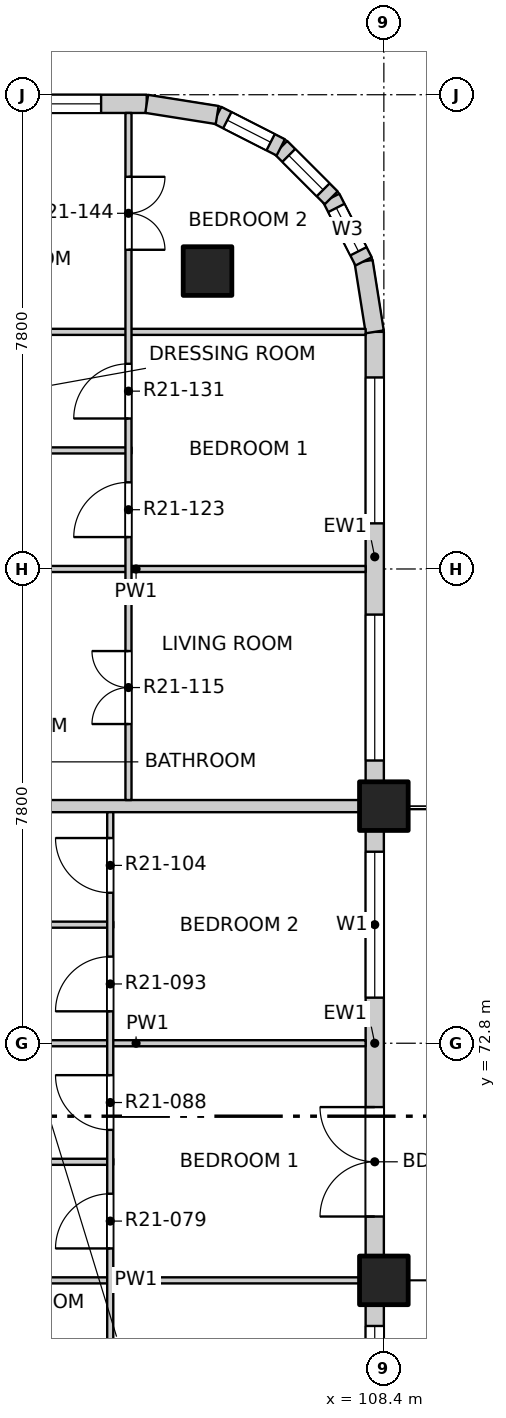
"""IFC4 building model, lengths in metres.
Left out: names, types, materials, properties, quantities, classifications, styles, units other than length and angle.
Written with IfcOpenShell. Run it as: python <this file> out.ifc"""

import sys

from ifc_helpers import new_model, si_unit, direction, frame, frame_2d, origin, origin_2d, place, context, subcontext, project, spatial, rectangle, extrude, element, fill, save


model = new_model("IFC4")
c1 = context("Model", 3, precision=1e-05, world=origin(), true_north=direction((0.0, 1.0)))
c2 = subcontext(c1, "Body", "Model", "MODEL_VIEW")
j1 = project(units=[si_unit("LENGTHUNIT", "METRE"), si_unit("PLANEANGLEUNIT", "RADIAN")], contexts=[c1])
p1 = place(None, origin())
s1 = spatial("IfcSite", under=j1, at=p1, CompositionType="ELEMENT")
p2 = place(p1, origin())
s2 = spatial("IfcBuilding", under=s1, at=p2, CompositionType="ELEMENT")
p3 = place(p2, frame((0.0, 0.0, 214.3)))
s3 = spatial("IfcBuildingStorey", under=s2, at=p3, CompositionType="ELEMENT", Elevation=214.3)
for number, where, z_axis, x_axis in (
    (1, (105.5, 85.5, -0.25), (0.0, 0.0, 1.0), (1.0, 0.0, 0.0)),
    (2, (108.4, 68.9, -0.25), (0.0, 0.0, 1.0), (1.0, 0.0, 0.0)),
    (3, (108.4, 76.7, -0.25), (0.0, 0.0, 1.0), (1.0, 0.0, 0.0)),
):
    element("IfcColumn", number, at=place(p3, frame(where, z_axis=z_axis, x_axis=x_axis)), inside=s3, PredefinedType="COLUMN", context=c2, shape_type="SweptSolid", body=[
        extrude(rectangle(XDim=0.8, YDim=0.8, at=origin_2d()), origin(), (0.0, 0.0, 1.0), 3.4),
    ])
p4 = place(p3, frame((108.25, 61.5, 0.0), z_axis=(0.0, 0.0, 1.0), x_axis=(0.0, 1.0, 0.0)))
e4 = element("IfcWall", 4, at=p4, inside=s3, PredefinedType="SOLIDWALL", context=c2, shape_type="SweptSolid", body=[
    extrude(rectangle(XDim=7.0, YDim=0.3, at=frame_2d((3.5, 0.0))), origin(), (0.0, 0.0, 1.0), 2.7),
])
p5 = place(p4, frame((0.65, 0.0, 0.0)))
e5 = element("IfcOpeningElement", 5, at=p5, cuts=e4, PredefinedType="OPENING", context=c2, shape_type="SweptSolid", body=[
    extrude(rectangle(XDim=1.8, YDim=2.4, at=frame_2d((0.9, 1.2))), frame((0.0, 0.16, 0.0), z_axis=(0.0, -1.0, 0.0), x_axis=(1.0, 0.0, 0.0)), (0.0, 0.0, 1.0), 0.32),
])
p6 = place(p4, frame((4.25, 0.0, 0.9)))
e6 = element("IfcOpeningElement", 6, at=p6, cuts=e4, PredefinedType="OPENING", context=c2, shape_type="SweptSolid", body=[
    extrude(rectangle(XDim=2.4, YDim=1.8, at=frame_2d((1.2, 0.9))), frame((0.0, 0.16, 0.0), z_axis=(0.0, -1.0, 0.0), x_axis=(1.0, 0.0, 0.0)), (0.0, 0.0, 1.0), 0.32),
])
p7 = place(p3, frame((108.25, 69.3, 0.0), z_axis=(0.0, 0.0, 1.0), x_axis=(0.0, 1.0, 0.0)))
e7 = element("IfcWall", 7, at=p7, inside=s3, PredefinedType="SOLIDWALL", context=c2, shape_type="SweptSolid", body=[
    extrude(rectangle(XDim=7.0, YDim=0.3, at=frame_2d((3.5, 0.0))), origin(), (0.0, 0.0, 1.0), 2.7),
])
p8 = place(p7, frame((0.65, 0.0, 0.0)))
e8 = element("IfcOpeningElement", 8, at=p8, cuts=e7, PredefinedType="OPENING", context=c2, shape_type="SweptSolid", body=[
    extrude(rectangle(XDim=1.8, YDim=2.4, at=frame_2d((0.9, 1.2))), frame((0.0, 0.16, 0.0), z_axis=(0.0, -1.0, 0.0), x_axis=(1.0, 0.0, 0.0)), (0.0, 0.0, 1.0), 0.32),
])
p9 = place(p7, frame((4.25, 0.0, 0.9)))
e9 = element("IfcOpeningElement", 9, at=p9, cuts=e7, PredefinedType="OPENING", context=c2, shape_type="SweptSolid", body=[
    extrude(rectangle(XDim=2.4, YDim=1.8, at=frame_2d((1.2, 0.9))), frame((0.0, 0.16, 0.0), z_axis=(0.0, -1.0, 0.0), x_axis=(1.0, 0.0, 0.0)), (0.0, 0.0, 1.0), 0.32),
])
p10 = place(p3, frame((108.25, 77.1, 0.0), z_axis=(0.0, 0.0, 1.0), x_axis=(0.0, 1.0, 0.0)))
e10 = element("IfcWall", 10, at=p10, inside=s3, PredefinedType="SOLIDWALL", context=c2, shape_type="SweptSolid", body=[
    extrude(rectangle(XDim=7.4, YDim=0.3, at=frame_2d((3.7, 0.0))), origin(), (0.0, 0.0, 1.0), 2.7),
])
p11 = place(p10, frame((0.35, 0.0, 0.9)))
e11 = element("IfcOpeningElement", 11, at=p11, cuts=e10, PredefinedType="OPENING", context=c2, shape_type="SweptSolid", body=[
    extrude(rectangle(XDim=2.4, YDim=1.8, at=frame_2d((1.2, 0.9))), frame((0.0, 0.16, 0.0), z_axis=(0.0, -1.0, 0.0), x_axis=(1.0, 0.0, 0.0)), (0.0, 0.0, 1.0), 0.32),
])
p12 = place(p10, frame((4.25, 0.0, 0.9)))
e12 = element("IfcOpeningElement", 12, at=p12, cuts=e10, PredefinedType="OPENING", context=c2, shape_type="SweptSolid", body=[
    extrude(rectangle(XDim=2.4, YDim=1.8, at=frame_2d((1.2, 0.9))), frame((0.0, 0.16, 0.0), z_axis=(0.0, -1.0, 0.0), x_axis=(1.0, 0.0, 0.0)), (0.0, 0.0, 1.0), 0.32),
])
p13 = place(p3, frame((97.1, 88.25, 0.0), z_axis=(0.0, 0.0, 1.0), x_axis=(1.0, 0.0, 0.0)))
e13 = element("IfcWall", 13, at=p13, inside=s3, PredefinedType="SOLIDWALL", context=c2, shape_type="SweptSolid", body=[
    extrude(rectangle(XDim=7.4, YDim=0.3, at=frame_2d((3.7, 0.0))), origin(), (0.0, 0.0, 1.0), 2.7),
])
p14 = place(p13, frame((0.35, 0.0, 0.9)))
e14 = element("IfcOpeningElement", 14, at=p14, cuts=e13, PredefinedType="OPENING", context=c2, shape_type="SweptSolid", body=[
    extrude(rectangle(XDim=2.4, YDim=1.8, at=frame_2d((1.2, 0.9))), frame((0.0, 0.16, 0.0), z_axis=(0.0, -1.0, 0.0), x_axis=(1.0, 0.0, 0.0)), (0.0, 0.0, 1.0), 0.32),
])
p15 = place(p13, frame((4.25, 0.0, 0.9)))
e15 = element("IfcOpeningElement", 15, at=p15, cuts=e13, PredefinedType="OPENING", context=c2, shape_type="SweptSolid", body=[
    extrude(rectangle(XDim=2.4, YDim=1.8, at=frame_2d((1.2, 0.9))), frame((0.0, 0.16, 0.0), z_axis=(0.0, -1.0, 0.0), x_axis=(1.0, 0.0, 0.0)), (0.0, 0.0, 1.0), 0.32),
])
p16 = place(p3, frame((108.25, 84.5, 0.0), z_axis=(0.0, 0.0, 1.0), x_axis=(-0.156496880861, 0.987678452879, 0.0)))
e16 = element("IfcWall", 16, at=p16, inside=s3, PredefinedType="SOLIDWALL", context=c2, shape_type="SweptSolid", body=[
    extrude(rectangle(XDim=1.173, YDim=0.3, at=frame_2d((0.586, 0.0))), origin(), (0.0, 0.0, 1.0), 2.7),
])
p17 = place(p3, frame((108.066, 85.659, 0.0), z_axis=(0.0, 0.0, 1.0), x_axis=(-0.454025524128, 0.890988677504, 0.0)))
e17 = element("IfcWall", 17, at=p17, inside=s3, PredefinedType="SOLIDWALL", context=c2, shape_type="SweptSolid", body=[
    extrude(rectangle(XDim=1.173, YDim=0.3, at=frame_2d((0.587, 0.0))), origin(), (0.0, 0.0, 1.0), 2.7),
])
p18 = place(p17, frame((0.187, 0.0, 0.9)))
e18 = element("IfcOpeningElement", 18, at=p18, cuts=e17, PredefinedType="OPENING", context=c2, shape_type="SweptSolid", body=[
    extrude(rectangle(XDim=0.8, YDim=1.2, at=frame_2d((0.4, 0.6))), frame((0.0, 0.16, 0.0), z_axis=(0.0, -1.0, 0.0), x_axis=(1.0, 0.0, 0.0)), (0.0, 0.0, 1.0), 0.32),
])
p19 = place(p3, frame((107.534, 86.704, 0.0), z_axis=(0.0, 0.0, 1.0), x_axis=(-0.707106781187, 0.707106781187, 0.0)))
e19 = element("IfcWall", 19, at=p19, inside=s3, PredefinedType="SOLIDWALL", context=c2, shape_type="SweptSolid", body=[
    extrude(rectangle(XDim=1.173, YDim=0.3, at=frame_2d((0.586, 0.0))), origin(), (0.0, 0.0, 1.0), 2.7),
])
p20 = place(p19, frame((0.187, 0.0, 0.9)))
e20 = element("IfcOpeningElement", 20, at=p20, cuts=e19, PredefinedType="OPENING", context=c2, shape_type="SweptSolid", body=[
    extrude(rectangle(XDim=0.8, YDim=1.2, at=frame_2d((0.4, 0.6))), frame((0.0, 0.16, 0.0), z_axis=(0.0, -1.0, 0.0), x_axis=(1.0, 0.0, 0.0)), (0.0, 0.0, 1.0), 0.32),
])
p21 = place(p3, frame((106.704, 87.534, 0.0), z_axis=(0.0, 0.0, 1.0), x_axis=(-0.890988677504, 0.454025524128, 0.0)))
e21 = element("IfcWall", 21, at=p21, inside=s3, PredefinedType="SOLIDWALL", context=c2, shape_type="SweptSolid", body=[
    extrude(rectangle(XDim=1.173, YDim=0.3, at=frame_2d((0.587, 0.0))), origin(), (0.0, 0.0, 1.0), 2.7),
])
p22 = place(p21, frame((0.187, 0.0, 0.9)))
e22 = element("IfcOpeningElement", 22, at=p22, cuts=e21, PredefinedType="OPENING", context=c2, shape_type="SweptSolid", body=[
    extrude(rectangle(XDim=0.8, YDim=1.2, at=frame_2d((0.4, 0.6))), frame((0.0, 0.16, 0.0), z_axis=(0.0, -1.0, 0.0), x_axis=(1.0, 0.0, 0.0)), (0.0, 0.0, 1.0), 0.32),
])
p23 = place(p3, frame((105.659, 88.066, 0.0), z_axis=(0.0, 0.0, 1.0), x_axis=(-0.987678452879, 0.156496880861, 0.0)))
e23 = element("IfcWall", 23, at=p23, inside=s3, PredefinedType="SOLIDWALL", context=c2, shape_type="SweptSolid", body=[
    extrude(rectangle(XDim=1.173, YDim=0.3, at=frame_2d((0.586, 0.0))), origin(), (0.0, 0.0, 1.0), 2.7),
])
p24 = place(p3, frame((100.55, 68.9, 0.0), z_axis=(0.0, 0.0, 1.0), x_axis=(1.0, 0.0, 0.0)))
e24 = element("IfcWall", 24, at=p24, inside=s3, PredefinedType="PARTITIONING", context=c2, shape_type="SweptSolid", body=[
    extrude(rectangle(XDim=7.55, YDim=0.1, at=frame_2d((3.775, 0.0))), origin(), (0.0, 0.0, 1.0), 2.55),
])
p25 = place(p3, frame((100.55, 70.85, 0.0), z_axis=(0.0, 0.0, 1.0), x_axis=(1.0, 0.0, 0.0)))
e25 = element("IfcWall", 25, at=p25, inside=s3, PredefinedType="PARTITIONING", context=c2, shape_type="SweptSolid", body=[
    extrude(rectangle(XDim=3.4, YDim=0.1, at=frame_2d((1.7, 0.0))), origin(), (0.0, 0.0, 1.0), 3.15),
])
p26 = place(p3, frame((100.55, 72.8, 0.0), z_axis=(0.0, 0.0, 1.0), x_axis=(1.0, 0.0, 0.0)))
e26 = element("IfcWall", 26, at=p26, inside=s3, PredefinedType="PARTITIONING", context=c2, shape_type="SweptSolid", body=[
    extrude(rectangle(XDim=7.55, YDim=0.1, at=frame_2d((3.775, 0.0))), origin(), (0.0, 0.0, 1.0), 3.15),
])
p27 = place(p3, frame((100.55, 74.75, 0.0), z_axis=(0.0, 0.0, 1.0), x_axis=(1.0, 0.0, 0.0)))
e27 = element("IfcWall", 27, at=p27, inside=s3, PredefinedType="PARTITIONING", context=c2, shape_type="SweptSolid", body=[
    extrude(rectangle(XDim=3.4, YDim=0.1, at=frame_2d((1.7, 0.0))), origin(), (0.0, 0.0, 1.0), 3.15),
])
p28 = place(p3, frame((96.6, 76.7, 0.0), z_axis=(0.0, 0.0, 1.0), x_axis=(1.0, 0.0, 0.0)))
e28 = element("IfcWall", 28, at=p28, inside=s3, PredefinedType="PARTITIONING", context=c2, shape_type="SweptSolid", body=[
    extrude(rectangle(XDim=11.5, YDim=0.2, at=frame_2d((5.75, 0.0))), origin(), (0.0, 0.0, 1.0), 2.55),
])
p29 = place(p3, frame((100.55, 80.6, 0.0), z_axis=(0.0, 0.0, 1.0), x_axis=(1.0, 0.0, 0.0)))
e29 = element("IfcWall", 29, at=p29, inside=s3, PredefinedType="PARTITIONING", context=c2, shape_type="SweptSolid", body=[
    extrude(rectangle(XDim=7.55, YDim=0.1, at=frame_2d((3.775, 0.0))), origin(), (0.0, 0.0, 1.0), 3.15),
])
p30 = place(p3, frame((100.55, 82.55, 0.0), z_axis=(0.0, 0.0, 1.0), x_axis=(1.0, 0.0, 0.0)))
e30 = element("IfcWall", 30, at=p30, inside=s3, PredefinedType="PARTITIONING", context=c2, shape_type="SweptSolid", body=[
    extrude(rectangle(XDim=3.7, YDim=0.1, at=frame_2d((1.85, 0.0))), origin(), (0.0, 0.0, 1.0), 3.15),
])
p31 = place(p3, frame((96.6, 84.5, 0.0), z_axis=(0.0, 0.0, 1.0), x_axis=(1.0, 0.0, 0.0)))
e31 = element("IfcWall", 31, at=p31, inside=s3, PredefinedType="PARTITIONING", context=c2, shape_type="SweptSolid", body=[
    extrude(rectangle(XDim=11.5, YDim=0.1, at=frame_2d((5.75, 0.0))), origin(), (0.0, 0.0, 1.0), 3.15),
])
p32 = place(p31, frame((2.635, 0.0, 0.0)))
e32 = element("IfcOpeningElement", 32, at=p32, cuts=e31, PredefinedType="OPENING", context=c2, shape_type="SweptSolid", body=[
    extrude(rectangle(XDim=0.9, YDim=2.1, at=frame_2d((0.45, 1.05))), frame((0.0, 0.06, 0.0), z_axis=(0.0, -1.0, 0.0), x_axis=(1.0, 0.0, 0.0)), (0.0, 0.0, 1.0), 0.12),
])
p33 = place(p3, frame((103.9, 65.1, 0.0), z_axis=(0.0, 0.0, 1.0), x_axis=(0.0, 1.0, 0.0)))
e33 = element("IfcWall", 33, at=p33, inside=s3, PredefinedType="PARTITIONING", context=c2, shape_type="SweptSolid", body=[
    extrude(rectangle(XDim=11.5, YDim=0.1, at=frame_2d((5.75, 0.0))), origin(), (0.0, 0.0, 1.0), 3.15),
])
p34 = place(p33, frame((1.25, 0.0, 0.0)))
e34 = element("IfcOpeningElement", 34, at=p34, cuts=e33, PredefinedType="OPENING", context=c2, shape_type="SweptSolid", body=[
    extrude(rectangle(XDim=1.2, YDim=2.1, at=frame_2d((0.6, 1.05))), frame((0.0, 0.06, 0.0), z_axis=(0.0, -1.0, 0.0), x_axis=(1.0, 0.0, 0.0)), (0.0, 0.0, 1.0), 0.12),
])
p35 = place(p33, frame((4.325, 0.0, 0.0)))
e35 = element("IfcOpeningElement", 35, at=p35, cuts=e33, PredefinedType="OPENING", context=c2, shape_type="SweptSolid", body=[
    extrude(rectangle(XDim=0.9, YDim=2.1, at=frame_2d((0.45, 1.05))), frame((0.0, 0.06, 0.0), z_axis=(0.0, -1.0, 0.0), x_axis=(1.0, 0.0, 0.0)), (0.0, 0.0, 1.0), 0.12),
])
p36 = place(p33, frame((6.275, 0.0, 0.0)))
e36 = element("IfcOpeningElement", 36, at=p36, cuts=e33, PredefinedType="OPENING", context=c2, shape_type="SweptSolid", body=[
    extrude(rectangle(XDim=0.9, YDim=2.1, at=frame_2d((0.45, 1.05))), frame((0.0, 0.06, 0.0), z_axis=(0.0, -1.0, 0.0), x_axis=(1.0, 0.0, 0.0)), (0.0, 0.0, 1.0), 0.12),
])
p37 = place(p33, frame((8.225, 0.0, 0.0)))
e37 = element("IfcOpeningElement", 37, at=p37, cuts=e33, PredefinedType="OPENING", context=c2, shape_type="SweptSolid", body=[
    extrude(rectangle(XDim=0.9, YDim=2.1, at=frame_2d((0.45, 1.05))), frame((0.0, 0.06, 0.0), z_axis=(0.0, -1.0, 0.0), x_axis=(1.0, 0.0, 0.0)), (0.0, 0.0, 1.0), 0.12),
])
p38 = place(p33, frame((10.175, 0.0, 0.0)))
e38 = element("IfcOpeningElement", 38, at=p38, cuts=e33, PredefinedType="OPENING", context=c2, shape_type="SweptSolid", body=[
    extrude(rectangle(XDim=0.9, YDim=2.1, at=frame_2d((0.45, 1.05))), frame((0.0, 0.06, 0.0), z_axis=(0.0, -1.0, 0.0), x_axis=(1.0, 0.0, 0.0)), (0.0, 0.0, 1.0), 0.12),
])
p39 = place(p3, frame((104.2, 76.8, 0.0), z_axis=(0.0, 0.0, 1.0), x_axis=(0.0, 1.0, 0.0)))
e39 = element("IfcWall", 39, at=p39, inside=s3, PredefinedType="PARTITIONING", context=c2, shape_type="SweptSolid", body=[
    extrude(rectangle(XDim=11.3, YDim=0.1, at=frame_2d((5.65, 0.0))), origin(), (0.0, 0.0, 1.0), 3.15),
])
p40 = place(p39, frame((1.25, 0.0, 0.0)))
e40 = element("IfcOpeningElement", 40, at=p40, cuts=e39, PredefinedType="OPENING", context=c2, shape_type="SweptSolid", body=[
    extrude(rectangle(XDim=1.2, YDim=2.1, at=frame_2d((0.6, 1.05))), frame((0.0, 0.06, 0.0), z_axis=(0.0, -1.0, 0.0), x_axis=(1.0, 0.0, 0.0)), (0.0, 0.0, 1.0), 0.12),
])
p41 = place(p39, frame((4.325, 0.0, 0.0)))
e41 = element("IfcOpeningElement", 41, at=p41, cuts=e39, PredefinedType="OPENING", context=c2, shape_type="SweptSolid", body=[
    extrude(rectangle(XDim=0.9, YDim=2.1, at=frame_2d((0.45, 1.05))), frame((0.0, 0.06, 0.0), z_axis=(0.0, -1.0, 0.0), x_axis=(1.0, 0.0, 0.0)), (0.0, 0.0, 1.0), 0.12),
])
p42 = place(p39, frame((6.275, 0.0, 0.0)))
e42 = element("IfcOpeningElement", 42, at=p42, cuts=e39, PredefinedType="OPENING", context=c2, shape_type="SweptSolid", body=[
    extrude(rectangle(XDim=0.9, YDim=2.1, at=frame_2d((0.45, 1.05))), frame((0.0, 0.06, 0.0), z_axis=(0.0, -1.0, 0.0), x_axis=(1.0, 0.0, 0.0)), (0.0, 0.0, 1.0), 0.12),
])
p43 = place(p39, frame((9.05, 0.0, 0.0)))
e43 = element("IfcOpeningElement", 43, at=p43, cuts=e39, PredefinedType="OPENING", context=c2, shape_type="SweptSolid", body=[
    extrude(rectangle(XDim=1.2, YDim=2.1, at=frame_2d((0.6, 1.05))), frame((0.0, 0.06, 0.0), z_axis=(0.0, -1.0, 0.0), x_axis=(1.0, 0.0, 0.0)), (0.0, 0.0, 1.0), 0.12),
])
p44 = place(p6, origin())
e44 = element("IfcWindow", 44, at=p44, inside=s3, PartitioningType="DOUBLE_PANEL_VERTICAL", PredefinedType="WINDOW", context=c2, shape_type="SweptSolid", body=[
    extrude(rectangle(XDim=2.4, YDim=1.8, at=frame_2d((1.2, 0.9))), frame((0.0, 0.03, 0.0), z_axis=(0.0, -1.0, 0.0), x_axis=(1.0, 0.0, 0.0)), (0.0, 0.0, 1.0), 0.06),
])
fill(e6, e44)
p45 = place(p8, origin())
e45 = element("IfcDoor", 45, at=p45, inside=s3, OperationType="DOUBLE_DOOR_SINGLE_SWING", PredefinedType="DOOR", context=c2, shape_type="SweptSolid", body=[
    extrude(rectangle(XDim=1.8, YDim=2.4, at=frame_2d((0.9, 1.2))), frame((0.0, 0.025, 0.0), z_axis=(0.0, -1.0, 0.0), x_axis=(1.0, 0.0, 0.0)), (0.0, 0.0, 1.0), 0.05),
])
fill(e8, e45)
p46 = place(p9, origin())
e46 = element("IfcWindow", 46, at=p46, inside=s3, PartitioningType="DOUBLE_PANEL_VERTICAL", PredefinedType="WINDOW", context=c2, shape_type="SweptSolid", body=[
    extrude(rectangle(XDim=2.4, YDim=1.8, at=frame_2d((1.2, 0.9))), frame((0.0, 0.03, 0.0), z_axis=(0.0, -1.0, 0.0), x_axis=(1.0, 0.0, 0.0)), (0.0, 0.0, 1.0), 0.06),
])
fill(e9, e46)
p47 = place(p11, origin())
e47 = element("IfcWindow", 47, at=p47, inside=s3, PartitioningType="DOUBLE_PANEL_VERTICAL", PredefinedType="WINDOW", context=c2, shape_type="SweptSolid", body=[
    extrude(rectangle(XDim=2.4, YDim=1.8, at=frame_2d((1.2, 0.9))), frame((0.0, 0.03, 0.0), z_axis=(0.0, -1.0, 0.0), x_axis=(1.0, 0.0, 0.0)), (0.0, 0.0, 1.0), 0.06),
])
fill(e11, e47)
p48 = place(p12, origin())
e48 = element("IfcWindow", 48, at=p48, inside=s3, PartitioningType="DOUBLE_PANEL_VERTICAL", PredefinedType="WINDOW", context=c2, shape_type="SweptSolid", body=[
    extrude(rectangle(XDim=2.4, YDim=1.8, at=frame_2d((1.2, 0.9))), frame((0.0, 0.03, 0.0), z_axis=(0.0, -1.0, 0.0), x_axis=(1.0, 0.0, 0.0)), (0.0, 0.0, 1.0), 0.06),
])
fill(e12, e48)
p49 = place(p15, origin())
e49 = element("IfcWindow", 49, at=p49, inside=s3, PartitioningType="DOUBLE_PANEL_VERTICAL", PredefinedType="WINDOW", context=c2, shape_type="SweptSolid", body=[
    extrude(rectangle(XDim=2.4, YDim=1.8, at=frame_2d((1.2, 0.9))), frame((0.0, 0.03, 0.0), z_axis=(0.0, -1.0, 0.0), x_axis=(1.0, 0.0, 0.0)), (0.0, 0.0, 1.0), 0.06),
])
fill(e15, e49)
p50 = place(p18, origin())
e50 = element("IfcWindow", 50, at=p50, inside=s3, PartitioningType="SINGLE_PANEL", PredefinedType="WINDOW", context=c2, shape_type="SweptSolid", body=[
    extrude(rectangle(XDim=0.8, YDim=1.2, at=frame_2d((0.4, 0.6))), frame((0.0, 0.03, 0.0), z_axis=(0.0, -1.0, 0.0), x_axis=(1.0, 0.0, 0.0)), (0.0, 0.0, 1.0), 0.06),
])
fill(e18, e50)
p51 = place(p20, origin())
e51 = element("IfcWindow", 51, at=p51, inside=s3, PartitioningType="SINGLE_PANEL", PredefinedType="WINDOW", context=c2, shape_type="SweptSolid", body=[
    extrude(rectangle(XDim=0.8, YDim=1.2, at=frame_2d((0.4, 0.6))), frame((0.0, 0.03, 0.0), z_axis=(0.0, -1.0, 0.0), x_axis=(1.0, 0.0, 0.0)), (0.0, 0.0, 1.0), 0.06),
])
fill(e20, e51)
p52 = place(p22, origin())
e52 = element("IfcWindow", 52, at=p52, inside=s3, PartitioningType="SINGLE_PANEL", PredefinedType="WINDOW", context=c2, shape_type="SweptSolid", body=[
    extrude(rectangle(XDim=0.8, YDim=1.2, at=frame_2d((0.4, 0.6))), frame((0.0, 0.03, 0.0), z_axis=(0.0, -1.0, 0.0), x_axis=(1.0, 0.0, 0.0)), (0.0, 0.0, 1.0), 0.06),
])
fill(e22, e52)
p53 = place(p35, origin())
e53 = element("IfcDoor", 53, at=p53, inside=s3, OperationType="SINGLE_SWING_LEFT", PredefinedType="DOOR", context=c2, shape_type="SweptSolid", body=[
    extrude(rectangle(XDim=0.9, YDim=2.1, at=frame_2d((0.45, 1.05))), frame((0.0, 0.025, 0.0), z_axis=(0.0, -1.0, 0.0), x_axis=(1.0, 0.0, 0.0)), (0.0, 0.0, 1.0), 0.05),
])
fill(e35, e53)
p54 = place(p36, origin())
e54 = element("IfcDoor", 54, at=p54, inside=s3, OperationType="SINGLE_SWING_RIGHT", PredefinedType="DOOR", context=c2, shape_type="SweptSolid", body=[
    extrude(rectangle(XDim=0.9, YDim=2.1, at=frame_2d((0.45, 1.05))), frame((0.0, 0.025, 0.0), z_axis=(0.0, -1.0, 0.0), x_axis=(1.0, 0.0, 0.0)), (0.0, 0.0, 1.0), 0.05),
])
fill(e36, e54)
p55 = place(p37, origin())
e55 = element("IfcDoor", 55, at=p55, inside=s3, OperationType="SINGLE_SWING_LEFT", PredefinedType="DOOR", context=c2, shape_type="SweptSolid", body=[
    extrude(rectangle(XDim=0.9, YDim=2.1, at=frame_2d((0.45, 1.05))), frame((0.0, 0.025, 0.0), z_axis=(0.0, -1.0, 0.0), x_axis=(1.0, 0.0, 0.0)), (0.0, 0.0, 1.0), 0.05),
])
fill(e37, e55)
p56 = place(p38, origin())
e56 = element("IfcDoor", 56, at=p56, inside=s3, OperationType="SINGLE_SWING_RIGHT", PredefinedType="DOOR", context=c2, shape_type="SweptSolid", body=[
    extrude(rectangle(XDim=0.9, YDim=2.1, at=frame_2d((0.45, 1.05))), frame((0.0, 0.025, 0.0), z_axis=(0.0, -1.0, 0.0), x_axis=(1.0, 0.0, 0.0)), (0.0, 0.0, 1.0), 0.05),
])
fill(e38, e56)
p57 = place(p40, origin())
e57 = element("IfcDoor", 57, at=p57, inside=s3, OperationType="DOUBLE_DOOR_SINGLE_SWING", PredefinedType="DOOR", context=c2, shape_type="SweptSolid", body=[
    extrude(rectangle(XDim=1.2, YDim=2.1, at=frame_2d((0.6, 1.05))), frame((0.0, 0.025, 0.0), z_axis=(0.0, -1.0, 0.0), x_axis=(1.0, 0.0, 0.0)), (0.0, 0.0, 1.0), 0.05),
])
fill(e40, e57)
p58 = place(p41, origin())
e58 = element("IfcDoor", 58, at=p58, inside=s3, OperationType="SINGLE_SWING_LEFT", PredefinedType="DOOR", context=c2, shape_type="SweptSolid", body=[
    extrude(rectangle(XDim=0.9, YDim=2.1, at=frame_2d((0.45, 1.05))), frame((0.0, 0.025, 0.0), z_axis=(0.0, -1.0, 0.0), x_axis=(1.0, 0.0, 0.0)), (0.0, 0.0, 1.0), 0.05),
])
fill(e41, e58)
p59 = place(p42, origin())
e59 = element("IfcDoor", 59, at=p59, inside=s3, OperationType="SINGLE_SWING_LEFT", PredefinedType="DOOR", context=c2, shape_type="SweptSolid", body=[
    extrude(rectangle(XDim=0.9, YDim=2.1, at=frame_2d((0.45, 1.05))), frame((0.0, 0.025, 0.0), z_axis=(0.0, -1.0, 0.0), x_axis=(1.0, 0.0, 0.0)), (0.0, 0.0, 1.0), 0.05),
])
fill(e42, e59)
p60 = place(p43, origin())
e60 = element("IfcDoor", 60, at=p60, inside=s3, OperationType="DOUBLE_DOOR_SINGLE_SWING", PredefinedType="DOOR", context=c2, shape_type="SweptSolid", body=[
    extrude(rectangle(XDim=1.2, YDim=2.1, at=frame_2d((0.6, 1.05))), frame((0.0, 0.025, 0.0), z_axis=(0.0, -1.0, 0.0), x_axis=(1.0, 0.0, 0.0)), (0.0, 0.0, 1.0), 0.05),
])
fill(e43, e60)
save(model, sys.argv[1])
